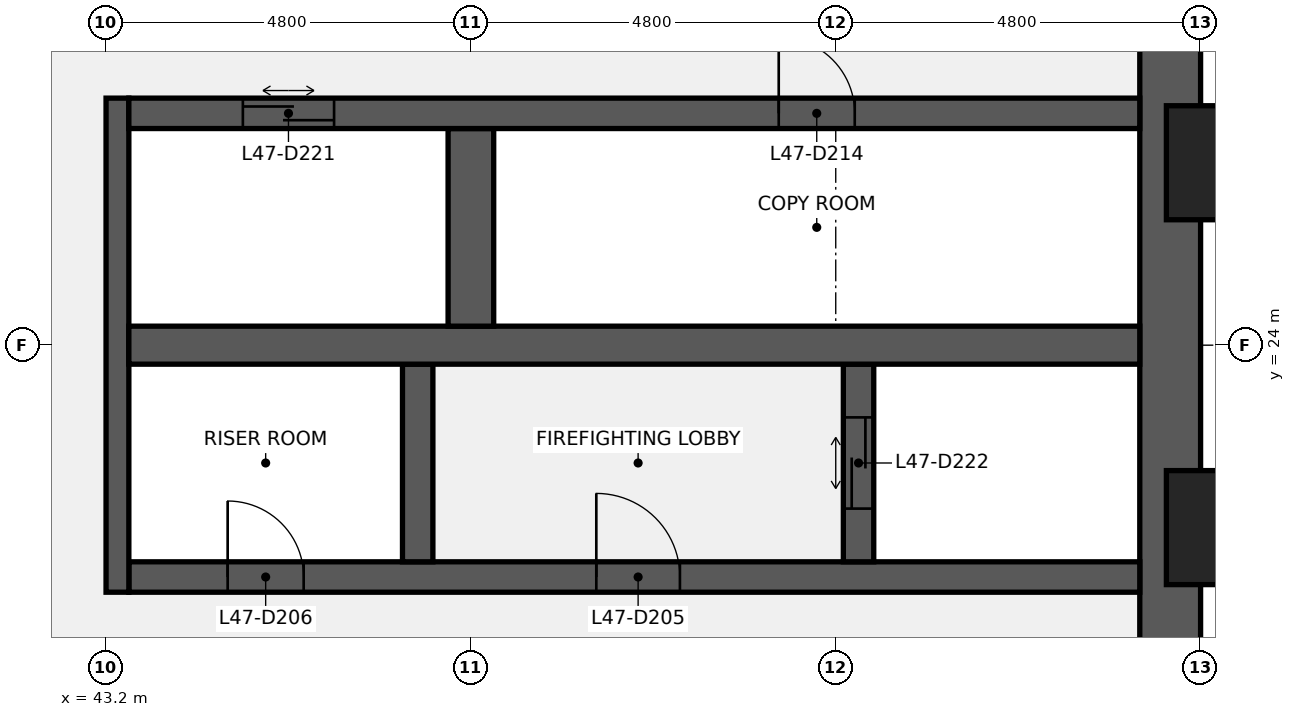
"""IFC4 building model, lengths in metres.
Left out: names, types, materials, properties, quantities, classifications, styles, units other than length and angle.
Written with IfcOpenShell. Run it as: python <this file> out.ifc"""

import sys

from ifc_helpers import new_model, si_unit, direction, frame, frame_2d, origin, origin_2d, place, context, subcontext, project, spatial, rectangle, extrude, element, fill, save


model = new_model("IFC4")
c1 = context("Model", 3, precision=1e-05, world=origin(), true_north=direction((0.0, 1.0)))
c2 = subcontext(c1, "Body", "Model", "MODEL_VIEW")
j1 = project(units=[si_unit("LENGTHUNIT", "METRE"), si_unit("PLANEANGLEUNIT", "RADIAN")], contexts=[c1])
p1 = place(None, origin())
s1 = spatial("IfcSite", under=j1, at=p1, CompositionType="ELEMENT")
p2 = place(p1, origin())
s2 = spatial("IfcBuilding", under=s1, at=p2, CompositionType="ELEMENT")
p3 = place(p2, frame((0.0, 0.0, 217.2)))
s3 = spatial("IfcBuildingStorey", under=s2, at=p3, CompositionType="ELEMENT", Elevation=217.2)
p4 = place(p3, frame((57.2, 38.4, 0.0), z_axis=(0.0, 0.0, 1.0), x_axis=(0.0, -1.0, 0.0)))
e1 = element("IfcWall", 1, at=p4, inside=s3, PredefinedType="SHEAR", context=c2, shape_type="SweptSolid", body=[
    extrude(rectangle(XDim=28.8, YDim=0.8, at=frame_2d((14.4, 0.0))), origin(), (0.0, 0.0, 1.0), 3.84),
])
p5 = place(p4, frame((18.45, 0.0, 0.9)))
e2 = element("IfcOpeningElement", 2, at=p5, cuts=e1, PredefinedType="OPENING", context=c2, shape_type="SweptSolid", body=[
    extrude(rectangle(XDim=1.5, YDim=1.5, at=frame_2d((0.75, 0.75))), frame((0.0, 0.41, 0.0), z_axis=(0.0, -1.0, 0.0), x_axis=(1.0, 0.0, 0.0)), (0.0, 0.0, 1.0), 0.82),
])
p6 = place(p4, frame((8.85, 0.0, 0.9)))
e3 = element("IfcOpeningElement", 3, at=p6, cuts=e1, PredefinedType="OPENING", context=c2, shape_type="SweptSolid", body=[
    extrude(rectangle(XDim=1.5, YDim=1.5, at=frame_2d((0.75, 0.75))), frame((0.0, 0.41, 0.0), z_axis=(0.0, -1.0, 0.0), x_axis=(1.0, 0.0, 0.0)), (0.0, 0.0, 1.0), 0.82),
])
p7 = place(p3, frame((43.5, 20.95, 0.0), z_axis=(0.0, 0.0, 1.0), x_axis=(1.0, 0.0, 0.0)))
e4 = element("IfcWall", 4, at=p7, inside=s3, PredefinedType="SHEAR", context=c2, shape_type="SweptSolid", body=[
    extrude(rectangle(XDim=13.3, YDim=0.4, at=frame_2d((6.65, 0.0))), origin(), (0.0, 0.0, 1.0), 3.84),
])
p8 = place(p7, frame((6.15, 0.0, 0.0)))
e5 = element("IfcOpeningElement", 5, at=p8, cuts=e4, PredefinedType="OPENING", context=c2, shape_type="SweptSolid", body=[
    extrude(rectangle(XDim=1.1, YDim=2.1, at=frame_2d((0.55, 1.05))), frame((0.0, 0.21, 0.0), z_axis=(0.0, -1.0, 0.0), x_axis=(1.0, 0.0, 0.0)), (0.0, 0.0, 1.0), 0.42),
])
p9 = place(p7, frame((1.3, 0.0, 0.0)))
e6 = element("IfcOpeningElement", 6, at=p9, cuts=e4, PredefinedType="OPENING", context=c2, shape_type="SweptSolid", body=[
    extrude(rectangle(XDim=1.0, YDim=2.1, at=frame_2d((0.5, 1.05))), frame((0.0, 0.21, 0.0), z_axis=(0.0, -1.0, 0.0), x_axis=(1.0, 0.0, 0.0)), (0.0, 0.0, 1.0), 0.42),
])
p10 = place(p3, frame((43.35, 20.75, 0.0), z_axis=(0.0, 0.0, 1.0), x_axis=(0.0, 1.0, 0.0)))
e7 = element("IfcWall", 7, at=p10, inside=s3, PredefinedType="SHEAR", context=c2, shape_type="SweptSolid", body=[
    extrude(rectangle(XDim=6.5, YDim=0.3, at=frame_2d((3.25, 0.0))), origin(), (0.0, 0.0, 1.0), 3.84),
])
p11 = place(p3, frame((53.1, 21.15, 0.0), z_axis=(0.0, 0.0, 1.0), x_axis=(0.0, 1.0, 0.0)))
e8 = element("IfcWall", 8, at=p11, inside=s3, PredefinedType="SHEAR", context=c2, shape_type="SweptSolid", body=[
    extrude(rectangle(XDim=2.6, YDim=0.4, at=frame_2d((1.3, 0.0))), origin(), (0.0, 0.0, 1.0), 3.84),
])
p12 = place(p11, frame((0.7, 0.0, 0.0)))
e9 = element("IfcOpeningElement", 9, at=p12, cuts=e8, PredefinedType="OPENING", context=c2, shape_type="SweptSolid", body=[
    extrude(rectangle(XDim=1.2, YDim=2.1, at=frame_2d((0.6, 1.05))), frame((0.0, 0.21, 0.0), z_axis=(0.0, -1.0, 0.0), x_axis=(1.0, 0.0, 0.0)), (0.0, 0.0, 1.0), 0.42),
])
p13 = place(p3, frame((47.3, 21.15, 0.0), z_axis=(0.0, 0.0, 1.0), x_axis=(0.0, 1.0, 0.0)))
e10 = element("IfcWall", 10, at=p13, inside=s3, PredefinedType="SHEAR", context=c2, shape_type="SweptSolid", body=[
    extrude(rectangle(XDim=2.6, YDim=0.4, at=frame_2d((1.3, 0.0))), origin(), (0.0, 0.0, 1.0), 3.84),
])
p14 = place(p3, frame((43.5, 24.0, 0.0), z_axis=(0.0, 0.0, 1.0), x_axis=(1.0, 0.0, 0.0)))
e11 = element("IfcWall", 11, at=p14, inside=s3, PredefinedType="SHEAR", context=c2, shape_type="SweptSolid", body=[
    extrude(rectangle(XDim=13.3, YDim=0.5, at=frame_2d((6.65, 0.0))), origin(), (0.0, 0.0, 1.0), 3.84),
])
p15 = place(p3, frame((48.0, 24.25, 0.0), z_axis=(0.0, 0.0, 1.0), x_axis=(0.0, 1.0, 0.0)))
e12 = element("IfcWall", 12, at=p15, inside=s3, PredefinedType="SHEAR", context=c2, shape_type="SweptSolid", body=[
    extrude(rectangle(XDim=2.6, YDim=0.6, at=frame_2d((1.3, 0.0))), origin(), (0.0, 0.0, 1.0), 3.84),
])
p16 = place(p3, frame((43.5, 27.05, 0.0), z_axis=(0.0, 0.0, 1.0), x_axis=(1.0, 0.0, 0.0)))
e13 = element("IfcWall", 13, at=p16, inside=s3, PredefinedType="SHEAR", context=c2, shape_type="SweptSolid", body=[
    extrude(rectangle(XDim=13.3, YDim=0.4, at=frame_2d((6.65, 0.0))), origin(), (0.0, 0.0, 1.0), 3.84),
])
p17 = place(p16, frame((8.55, 0.0, 0.0)))
e14 = element("IfcOpeningElement", 14, at=p17, cuts=e13, PredefinedType="OPENING", context=c2, shape_type="SweptSolid", body=[
    extrude(rectangle(XDim=1.0, YDim=2.1, at=frame_2d((0.5, 1.05))), frame((0.0, 0.21, 0.0), z_axis=(0.0, -1.0, 0.0), x_axis=(1.0, 0.0, 0.0)), (0.0, 0.0, 1.0), 0.42),
])
p18 = place(p16, frame((1.5, 0.0, 0.0)))
e15 = element("IfcOpeningElement", 15, at=p18, cuts=e13, PredefinedType="OPENING", context=c2, shape_type="SweptSolid", body=[
    extrude(rectangle(XDim=1.2, YDim=2.1, at=frame_2d((0.6, 1.05))), frame((0.0, 0.21, 0.0), z_axis=(0.0, -1.0, 0.0), x_axis=(1.0, 0.0, 0.0)), (0.0, 0.0, 1.0), 0.42),
])
for number, where, z_axis, x_axis in (
    (16, (58.35, 21.6, 0.0), (0.0, 0.0, 1.0), (0.0, 1.0, 0.0)),
    (17, (58.35, 26.4, 0.0), (0.0, 0.0, 1.0), (0.0, 1.0, 0.0)),
):
    element("IfcColumn", number, at=place(p3, frame(where, z_axis=z_axis, x_axis=x_axis)), inside=s3, PredefinedType="PILASTER", context=c2, shape_type="SweptSolid", body=[
        extrude(rectangle(XDim=2.4, YDim=1.5, at=origin_2d()), origin(), (0.0, 0.0, 1.0), 4.0),
    ])
p19 = place(p8, origin())
e18 = element("IfcDoor", 18, at=p19, inside=s3, OperationType="SINGLE_SWING_LEFT", PredefinedType="DOOR", context=c2, shape_type="SweptSolid", body=[
    extrude(rectangle(XDim=1.1, YDim=2.1, at=frame_2d((0.55, 1.05))), frame((0.0, 0.025, 0.0), z_axis=(0.0, -1.0, 0.0), x_axis=(1.0, 0.0, 0.0)), (0.0, 0.0, 1.0), 0.05),
])
fill(e5, e18)
p20 = place(p9, origin())
e19 = element("IfcDoor", 19, at=p20, inside=s3, OperationType="SINGLE_SWING_LEFT", PredefinedType="DOOR", context=c2, shape_type="SweptSolid", body=[
    extrude(rectangle(XDim=1.0, YDim=2.1, at=frame_2d((0.5, 1.05))), frame((0.0, 0.025, 0.0), z_axis=(0.0, -1.0, 0.0), x_axis=(1.0, 0.0, 0.0)), (0.0, 0.0, 1.0), 0.05),
])
fill(e6, e19)
p21 = place(p17, origin())
e20 = element("IfcDoor", 20, at=p21, inside=s3, OperationType="SINGLE_SWING_LEFT", PredefinedType="DOOR", context=c2, shape_type="SweptSolid", body=[
    extrude(rectangle(XDim=1.0, YDim=2.1, at=frame_2d((0.5, 1.05))), frame((0.0, 0.025, 0.0), z_axis=(0.0, -1.0, 0.0), x_axis=(1.0, 0.0, 0.0)), (0.0, 0.0, 1.0), 0.05),
])
fill(e14, e20)
p22 = place(p18, origin())
e21 = element("IfcDoor", 21, at=p22, inside=s3, OperationType="DOUBLE_DOOR_SLIDING", PredefinedType="DOOR", context=c2, shape_type="SweptSolid", body=[
    extrude(rectangle(XDim=1.2, YDim=2.1, at=frame_2d((0.6, 1.05))), frame((0.0, 0.025, 0.0), z_axis=(0.0, -1.0, 0.0), x_axis=(1.0, 0.0, 0.0)), (0.0, 0.0, 1.0), 0.05),
])
fill(e15, e21)
p23 = place(p12, origin())
e22 = element("IfcDoor", 22, at=p23, inside=s3, OperationType="DOUBLE_DOOR_SLIDING", PredefinedType="DOOR", context=c2, shape_type="SweptSolid", body=[
    extrude(rectangle(XDim=1.2, YDim=2.1, at=frame_2d((0.6, 1.05))), frame((0.0, 0.025, 0.0), z_axis=(0.0, -1.0, 0.0), x_axis=(1.0, 0.0, 0.0)), (0.0, 0.0, 1.0), 0.05),
])
fill(e9, e22)
save(model, sys.argv[1])
